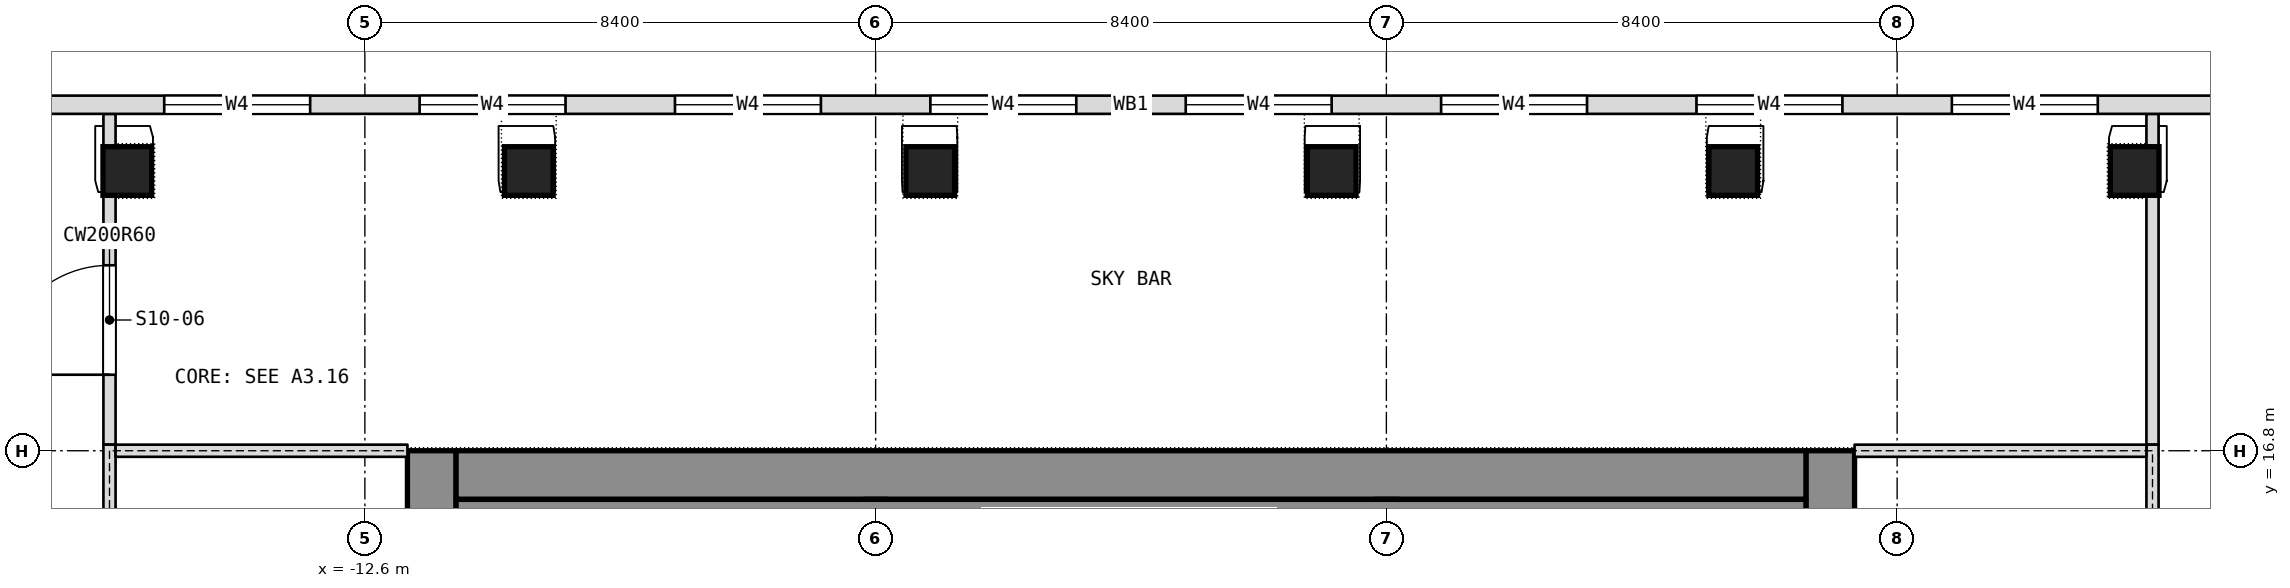
"""IFC4 building model, lengths in metres.
Left out: names, types, materials, properties, quantities, classifications, styles, units other than length and angle.
Written with IfcOpenShell. Run it as: python <this file> out.ifc"""

import sys

from ifc_helpers import new_model, si_unit, direction, frame, frame_2d, origin, origin_2d, place, context, subcontext, project, spatial, rectangle, extrude, element, fill, save


model = new_model("IFC4")
c1 = context("Model", 3, precision=1e-05, world=origin(), true_north=direction((0.0, 1.0)))
c2 = subcontext(c1, "Body", "Model", "MODEL_VIEW")
j1 = project(units=[si_unit("LENGTHUNIT", "METRE"), si_unit("PLANEANGLEUNIT", "RADIAN")], contexts=[c1])
p1 = place(None, origin())
s1 = spatial("IfcSite", under=j1, at=p1, CompositionType="ELEMENT")
p2 = place(p1, origin())
s2 = spatial("IfcBuilding", under=s1, at=p2, CompositionType="ELEMENT")
p3 = place(p2, frame((0.0, 0.0, 180.5)))
s3 = spatial("IfcBuildingStorey", under=s2, at=p3, CompositionType="ELEMENT", Elevation=180.5)
p4 = place(p3, frame((11.5, 0.0, 0.0), z_axis=(0.0, 0.0, 1.0), x_axis=(0.0, 1.0, 0.0)))
e1 = element("IfcWall", 1, at=p4, inside=s3, PredefinedType="SHEAR", context=c2, shape_type="SweptSolid", body=[
    extrude(rectangle(XDim=16.8, YDim=0.8, at=frame_2d((8.4, 0.0))), origin(), (0.0, 0.0, 1.0), 7.2),
])
p5 = place(p4, frame((2.3, 0.0, 0.0)))
e2 = element("IfcOpeningElement", 2, at=p5, cuts=e1, PredefinedType="OPENING", context=c2, shape_type="SweptSolid", body=[
    extrude(rectangle(XDim=1.1, YDim=2.1, at=frame_2d((0.55, 1.05))), frame((0.0, 0.4, 0.0), z_axis=(0.0, -1.0, 0.0), x_axis=(1.0, 0.0, 0.0)), (0.0, 0.0, 1.0), 0.8),
])
p6 = place(p4, frame((4.85, 0.0, 0.0)))
e3 = element("IfcOpeningElement", 3, at=p6, cuts=e1, PredefinedType="OPENING", context=c2, shape_type="SweptSolid", body=[
    extrude(rectangle(XDim=1.1, YDim=2.1, at=frame_2d((0.55, 1.05))), frame((0.0, 0.4, 0.0), z_axis=(0.0, -1.0, 0.0), x_axis=(1.0, 0.0, 0.0)), (0.0, 0.0, 1.0), 0.8),
])
p7 = place(p4, frame((6.825, 0.0, 0.0)))
e4 = element("IfcOpeningElement", 4, at=p7, cuts=e1, PredefinedType="OPENING", context=c2, shape_type="SweptSolid", body=[
    extrude(rectangle(XDim=1.2, YDim=2.1, at=frame_2d((0.6, 1.05))), frame((0.0, 0.4, 0.0), z_axis=(0.0, -1.0, 0.0), x_axis=(1.0, 0.0, 0.0)), (0.0, 0.0, 1.0), 0.8),
])
p8 = place(p4, frame((13.4, 0.0, 0.0)))
e5 = element("IfcOpeningElement", 5, at=p8, cuts=e1, PredefinedType="OPENING", context=c2, shape_type="SweptSolid", body=[
    extrude(rectangle(XDim=1.1, YDim=2.1, at=frame_2d((0.55, 1.05))), frame((0.0, 0.4, 0.0), z_axis=(0.0, -1.0, 0.0), x_axis=(1.0, 0.0, 0.0)), (0.0, 0.0, 1.0), 0.8),
])
p9 = place(p4, frame((10.85, 0.0, 0.0)))
e6 = element("IfcOpeningElement", 6, at=p9, cuts=e1, PredefinedType="OPENING", context=c2, shape_type="SweptSolid", body=[
    extrude(rectangle(XDim=1.1, YDim=2.1, at=frame_2d((0.55, 1.05))), frame((0.0, 0.4, 0.0), z_axis=(0.0, -1.0, 0.0), x_axis=(1.0, 0.0, 0.0)), (0.0, 0.0, 1.0), 0.8),
])
p10 = place(p4, frame((8.775, 0.0, 0.0)))
e7 = element("IfcOpeningElement", 7, at=p10, cuts=e1, PredefinedType="OPENING", context=c2, shape_type="SweptSolid", body=[
    extrude(rectangle(XDim=1.2, YDim=2.1, at=frame_2d((0.6, 1.05))), frame((0.0, 0.4, 0.0), z_axis=(0.0, -1.0, 0.0), x_axis=(1.0, 0.0, 0.0)), (0.0, 0.0, 1.0), 0.8),
])
p11 = place(p3, frame((-11.5, 0.0, 0.0), z_axis=(0.0, 0.0, 1.0), x_axis=(0.0, 1.0, 0.0)))
e8 = element("IfcWall", 8, at=p11, inside=s3, PredefinedType="SHEAR", context=c2, shape_type="SweptSolid", body=[
    extrude(rectangle(XDim=16.8, YDim=0.8, at=frame_2d((8.4, 0.0))), origin(), (0.0, 0.0, 1.0), 7.2),
])
p12 = place(p11, frame((3.6, 0.0, 0.0)))
e9 = element("IfcOpeningElement", 9, at=p12, cuts=e8, PredefinedType="OPENING", context=c2, shape_type="SweptSolid", body=[
    extrude(rectangle(XDim=0.9, YDim=2.1, at=frame_2d((0.45, 1.05))), frame((0.0, 0.4, 0.0), z_axis=(0.0, -1.0, 0.0), x_axis=(1.0, 0.0, 0.0)), (0.0, 0.0, 1.0), 0.8),
])
p13 = place(p11, frame((6.825, 0.0, 0.0)))
e10 = element("IfcOpeningElement", 10, at=p13, cuts=e8, PredefinedType="OPENING", context=c2, shape_type="SweptSolid", body=[
    extrude(rectangle(XDim=1.2, YDim=2.1, at=frame_2d((0.6, 1.05))), frame((0.0, 0.4, 0.0), z_axis=(0.0, -1.0, 0.0), x_axis=(1.0, 0.0, 0.0)), (0.0, 0.0, 1.0), 0.8),
])
p14 = place(p11, frame((12.3, 0.0, 0.0)))
e11 = element("IfcOpeningElement", 11, at=p14, cuts=e8, PredefinedType="OPENING", context=c2, shape_type="SweptSolid", body=[
    extrude(rectangle(XDim=0.9, YDim=2.1, at=frame_2d((0.45, 1.05))), frame((0.0, 0.4, 0.0), z_axis=(0.0, -1.0, 0.0), x_axis=(1.0, 0.0, 0.0)), (0.0, 0.0, 1.0), 0.8),
])
p15 = place(p11, frame((8.775, 0.0, 0.0)))
e12 = element("IfcOpeningElement", 12, at=p15, cuts=e8, PredefinedType="OPENING", context=c2, shape_type="SweptSolid", body=[
    extrude(rectangle(XDim=1.2, YDim=2.1, at=frame_2d((0.6, 1.05))), frame((0.0, 0.4, 0.0), z_axis=(0.0, -1.0, 0.0), x_axis=(1.0, 0.0, 0.0)), (0.0, 0.0, 1.0), 0.8),
])
p16 = place(p3, frame((-11.1, 16.4, 0.0), z_axis=(0.0, 0.0, 1.0), x_axis=(1.0, 0.0, 0.0)))
e13 = element("IfcWall", 13, at=p16, inside=s3, PredefinedType="SHEAR", context=c2, shape_type="SweptSolid", body=[
    extrude(rectangle(XDim=22.2, YDim=0.8, at=frame_2d((11.1, 0.0))), origin(), (0.0, 0.0, 1.0), 7.2),
])
p17 = place(p3, frame((-4.2, 0.8, 0.0), z_axis=(0.0, 0.0, 1.0), x_axis=(0.0, 1.0, 0.0)))
e14 = element("IfcWall", 14, at=p17, inside=s3, PredefinedType="SHEAR", context=c2, shape_type="SweptSolid", body=[
    extrude(rectangle(XDim=15.2, YDim=0.4, at=frame_2d((7.6, 0.0))), origin(), (0.0, 0.0, 1.0), 7.2),
])
p18 = place(p17, frame((8.5, 0.0, 0.0)))
e15 = element("IfcOpeningElement", 15, at=p18, cuts=e14, PredefinedType="OPENING", context=c2, shape_type="SweptSolid", body=[
    extrude(rectangle(XDim=1.2, YDim=2.1, at=frame_2d((0.6, 1.05))), frame((0.0, 0.2, 0.0), z_axis=(0.0, -1.0, 0.0), x_axis=(1.0, 0.0, 0.0)), (0.0, 0.0, 1.0), 0.4),
])
p19 = place(p3, frame((4.2, 0.8, 0.0), z_axis=(0.0, 0.0, 1.0), x_axis=(0.0, 1.0, 0.0)))
e16 = element("IfcWall", 16, at=p19, inside=s3, PredefinedType="SHEAR", context=c2, shape_type="SweptSolid", body=[
    extrude(rectangle(XDim=15.2, YDim=0.4, at=frame_2d((7.6, 0.0))), origin(), (0.0, 0.0, 1.0), 7.2),
])
p20 = place(p19, frame((5.95, 0.0, 0.0)))
e17 = element("IfcOpeningElement", 17, at=p20, cuts=e16, PredefinedType="OPENING", context=c2, shape_type="SweptSolid", body=[
    extrude(rectangle(XDim=1.2, YDim=2.1, at=frame_2d((0.6, 1.05))), frame((0.0, 0.2, 0.0), z_axis=(0.0, -1.0, 0.0), x_axis=(1.0, 0.0, 0.0)), (0.0, 0.0, 1.0), 0.4),
])
for number, where, z_axis, x_axis in (
    (18, (-16.507, 21.4, 0.0), (0.0, 0.0, 1.0), (1.0, 0.0, 0.0)),
    (19, (-9.904, 21.4, 0.0), (0.0, 0.0, 1.0), (1.0, 0.0, 0.0)),
    (20, (-3.302, 21.4, 0.0), (0.0, 0.0, 1.0), (1.0, 0.0, 0.0)),
    (21, (3.302, 21.4, 0.0), (0.0, 0.0, 1.0), (1.0, 0.0, 0.0)),
    (22, (9.904, 21.4, 0.0), (0.0, 0.0, 1.0), (1.0, 0.0, 0.0)),
    (23, (16.507, 21.4, 0.0), (0.0, 0.0, 1.0), (1.0, 0.0, 0.0)),
):
    element("IfcColumn", number, at=place(p3, frame(where, z_axis=z_axis, x_axis=x_axis)), inside=s3, PredefinedType="COLUMN", context=c2, shape_type="SweptSolid", body=[
        extrude(rectangle(XDim=0.8, YDim=0.8, at=origin_2d()), origin(), (0.0, 0.0, 1.0), 7.2),
    ])
p21 = place(p3, frame((16.8, 16.9, 0.0), z_axis=(0.0, 0.0, 1.0), x_axis=(0.0, 1.0, 0.0)))
e24 = element("IfcWall", 24, at=p21, inside=s3, PredefinedType="PARTITIONING", context=c2, shape_type="SweptSolid", body=[
    extrude(rectangle(XDim=4.1, YDim=0.2, at=frame_2d((2.05, 0.0))), origin(), (0.0, 0.0, 1.0), 6.94),
])
p22 = place(p3, frame((16.8, 21.8, 0.0), z_axis=(0.0, 0.0, 1.0), x_axis=(0.0, 1.0, 0.0)))
e25 = element("IfcWall", 25, at=p22, inside=s3, PredefinedType="PARTITIONING", context=c2, shape_type="SweptSolid", body=[
    extrude(rectangle(XDim=0.54, YDim=0.2, at=frame_2d((0.27, 0.0))), origin(), (0.0, 0.0, 1.0), 6.94),
])
p23 = place(p3, frame((-16.8, 16.9, 0.0), z_axis=(0.0, 0.0, 1.0), x_axis=(0.0, 1.0, 0.0)))
e26 = element("IfcWall", 26, at=p23, inside=s3, PredefinedType="PARTITIONING", context=c2, shape_type="SweptSolid", body=[
    extrude(rectangle(XDim=4.1, YDim=0.2, at=frame_2d((2.05, 0.0))), origin(), (0.0, 0.0, 1.0), 6.94),
])
p24 = place(p23, frame((1.15, 0.0, 0.0)))
e27 = element("IfcOpeningElement", 27, at=p24, cuts=e26, PredefinedType="OPENING", context=c2, shape_type="SweptSolid", body=[
    extrude(rectangle(XDim=1.8, YDim=2.1, at=frame_2d((0.9, 1.05))), frame((0.0, 0.1, 0.0), z_axis=(0.0, -1.0, 0.0), x_axis=(1.0, 0.0, 0.0)), (0.0, 0.0, 1.0), 0.2),
])
p25 = place(p3, frame((-16.8, 21.8, 0.0), z_axis=(0.0, 0.0, 1.0), x_axis=(0.0, 1.0, 0.0)))
e28 = element("IfcWall", 28, at=p25, inside=s3, PredefinedType="PARTITIONING", context=c2, shape_type="SweptSolid", body=[
    extrude(rectangle(XDim=0.54, YDim=0.2, at=frame_2d((0.27, 0.0))), origin(), (0.0, 0.0, 1.0), 6.94),
])
p26 = place(p3, frame((19.206, 22.49, 0.0), z_axis=(0.0, 0.0, 1.0), x_axis=(-1.0, 0.0, 0.0)))
e29 = element("IfcWall", 29, at=p26, inside=s3, PredefinedType="NOTDEFINED", context=c2, shape_type="SweptSolid", body=[
    extrude(rectangle(XDim=38.412, YDim=0.3, at=frame_2d((19.206, 0.0))), origin(), (0.0, 0.0, 1.0), 7.2),
])
p27 = place(p26, frame((3.306, 0.0, 0.9)))
e30 = element("IfcOpeningElement", 30, at=p27, cuts=e29, PredefinedType="OPENING", context=c2, shape_type="SweptSolid", body=[
    extrude(rectangle(XDim=2.4, YDim=4.5, at=frame_2d((1.2, 2.25))), frame((0.0, 0.15, 0.0), z_axis=(0.0, -1.0, 0.0), x_axis=(1.0, 0.0, 0.0)), (0.0, 0.0, 1.0), 0.3),
])
p28 = place(p26, frame((7.506, 0.0, 0.9)))
e31 = element("IfcOpeningElement", 31, at=p28, cuts=e29, PredefinedType="OPENING", context=c2, shape_type="SweptSolid", body=[
    extrude(rectangle(XDim=2.4, YDim=4.5, at=frame_2d((1.2, 2.25))), frame((0.0, 0.15, 0.0), z_axis=(0.0, -1.0, 0.0), x_axis=(1.0, 0.0, 0.0)), (0.0, 0.0, 1.0), 0.3),
])
p29 = place(p26, frame((11.706, 0.0, 0.9)))
e32 = element("IfcOpeningElement", 32, at=p29, cuts=e29, PredefinedType="OPENING", context=c2, shape_type="SweptSolid", body=[
    extrude(rectangle(XDim=2.4, YDim=4.5, at=frame_2d((1.2, 2.25))), frame((0.0, 0.15, 0.0), z_axis=(0.0, -1.0, 0.0), x_axis=(1.0, 0.0, 0.0)), (0.0, 0.0, 1.0), 0.3),
])
p30 = place(p26, frame((15.906, 0.0, 0.9)))
e33 = element("IfcOpeningElement", 33, at=p30, cuts=e29, PredefinedType="OPENING", context=c2, shape_type="SweptSolid", body=[
    extrude(rectangle(XDim=2.4, YDim=4.5, at=frame_2d((1.2, 2.25))), frame((0.0, 0.15, 0.0), z_axis=(0.0, -1.0, 0.0), x_axis=(1.0, 0.0, 0.0)), (0.0, 0.0, 1.0), 0.3),
])
p31 = place(p26, frame((20.106, 0.0, 0.9)))
e34 = element("IfcOpeningElement", 34, at=p31, cuts=e29, PredefinedType="OPENING", context=c2, shape_type="SweptSolid", body=[
    extrude(rectangle(XDim=2.4, YDim=4.5, at=frame_2d((1.2, 2.25))), frame((0.0, 0.15, 0.0), z_axis=(0.0, -1.0, 0.0), x_axis=(1.0, 0.0, 0.0)), (0.0, 0.0, 1.0), 0.3),
])
p32 = place(p26, frame((24.306, 0.0, 0.9)))
e35 = element("IfcOpeningElement", 35, at=p32, cuts=e29, PredefinedType="OPENING", context=c2, shape_type="SweptSolid", body=[
    extrude(rectangle(XDim=2.4, YDim=4.5, at=frame_2d((1.2, 2.25))), frame((0.0, 0.15, 0.0), z_axis=(0.0, -1.0, 0.0), x_axis=(1.0, 0.0, 0.0)), (0.0, 0.0, 1.0), 0.3),
])
p33 = place(p26, frame((28.506, 0.0, 0.9)))
e36 = element("IfcOpeningElement", 36, at=p33, cuts=e29, PredefinedType="OPENING", context=c2, shape_type="SweptSolid", body=[
    extrude(rectangle(XDim=2.4, YDim=4.5, at=frame_2d((1.2, 2.25))), frame((0.0, 0.15, 0.0), z_axis=(0.0, -1.0, 0.0), x_axis=(1.0, 0.0, 0.0)), (0.0, 0.0, 1.0), 0.3),
])
p34 = place(p26, frame((32.706, 0.0, 0.9)))
e37 = element("IfcOpeningElement", 37, at=p34, cuts=e29, PredefinedType="OPENING", context=c2, shape_type="SweptSolid", body=[
    extrude(rectangle(XDim=2.4, YDim=4.5, at=frame_2d((1.2, 2.25))), frame((0.0, 0.15, 0.0), z_axis=(0.0, -1.0, 0.0), x_axis=(1.0, 0.0, 0.0)), (0.0, 0.0, 1.0), 0.3),
])
p35 = place(p3, frame((-11.1, 15.65, 0.0), z_axis=(0.0, 0.0, 1.0), x_axis=(1.0, 0.0, 0.0)))
e38 = element("IfcWall", 38, at=p35, inside=s3, PredefinedType="PARTITIONING", context=c2, shape_type="SweptSolid", body=[
    extrude(rectangle(XDim=22.2, YDim=0.7, at=frame_2d((11.1, 0.0))), origin(), (0.0, 0.0, 1.0), 6.94),
])
p36 = place(p3, frame((-16.8, -0.1, 0.0), z_axis=(0.0, 0.0, 1.0), x_axis=(0.0, 1.0, 0.0)))
e39 = element("IfcWall", 39, at=p36, inside=s3, PredefinedType="PARTITIONING", context=c2, shape_type="SweptSolid", body=[
    extrude(rectangle(XDim=17.0, YDim=0.2, at=frame_2d((8.5, 0.0))), origin(), (0.0, 0.0, 1.0), 6.94),
])
p37 = place(p36, frame((1.9, 0.0, 0.0)))
e40 = element("IfcOpeningElement", 40, at=p37, cuts=e39, PredefinedType="OPENING", context=c2, shape_type="SweptSolid", body=[
    extrude(rectangle(XDim=2.4, YDim=2.1, at=frame_2d((1.2, 1.05))), frame((0.0, 0.1, 0.0), z_axis=(0.0, -1.0, 0.0), x_axis=(1.0, 0.0, 0.0)), (0.0, 0.0, 1.0), 0.2),
])
p38 = place(p36, frame((12.7, 0.0, 0.0)))
e41 = element("IfcOpeningElement", 41, at=p38, cuts=e39, PredefinedType="OPENING", context=c2, shape_type="SweptSolid", body=[
    extrude(rectangle(XDim=2.4, YDim=2.1, at=frame_2d((1.2, 1.05))), frame((0.0, 0.1, 0.0), z_axis=(0.0, -1.0, 0.0), x_axis=(1.0, 0.0, 0.0)), (0.0, 0.0, 1.0), 0.2),
])
p39 = place(p3, frame((-16.7, 16.8, 0.0), z_axis=(0.0, 0.0, 1.0), x_axis=(1.0, 0.0, 0.0)))
e42 = element("IfcWall", 42, at=p39, inside=s3, PredefinedType="PARTITIONING", context=c2, shape_type="SweptSolid", body=[
    extrude(rectangle(XDim=4.8, YDim=0.2, at=frame_2d((2.4, 0.0))), origin(), (0.0, 0.0, 1.0), 6.54),
])
p40 = place(p3, frame((16.8, -0.1, 0.0), z_axis=(0.0, 0.0, 1.0), x_axis=(0.0, 1.0, 0.0)))
e43 = element("IfcWall", 43, at=p40, inside=s3, PredefinedType="PARTITIONING", context=c2, shape_type="SweptSolid", body=[
    extrude(rectangle(XDim=17.0, YDim=0.2, at=frame_2d((8.5, 0.0))), origin(), (0.0, 0.0, 1.0), 6.94),
])
p41 = place(p40, frame((1.9, 0.0, 0.0)))
e44 = element("IfcOpeningElement", 44, at=p41, cuts=e43, PredefinedType="OPENING", context=c2, shape_type="SweptSolid", body=[
    extrude(rectangle(XDim=2.4, YDim=2.1, at=frame_2d((1.2, 1.05))), frame((0.0, 0.1, 0.0), z_axis=(0.0, -1.0, 0.0), x_axis=(1.0, 0.0, 0.0)), (0.0, 0.0, 1.0), 0.2),
])
p42 = place(p40, frame((12.7, 0.0, 0.0)))
e45 = element("IfcOpeningElement", 45, at=p42, cuts=e43, PredefinedType="OPENING", context=c2, shape_type="SweptSolid", body=[
    extrude(rectangle(XDim=2.4, YDim=2.1, at=frame_2d((1.2, 1.05))), frame((0.0, 0.1, 0.0), z_axis=(0.0, -1.0, 0.0), x_axis=(1.0, 0.0, 0.0)), (0.0, 0.0, 1.0), 0.2),
])
p43 = place(p3, frame((11.9, 16.8, 0.0), z_axis=(0.0, 0.0, 1.0), x_axis=(1.0, 0.0, 0.0)))
e46 = element("IfcWall", 46, at=p43, inside=s3, PredefinedType="PARTITIONING", context=c2, shape_type="SweptSolid", body=[
    extrude(rectangle(XDim=4.8, YDim=0.2, at=frame_2d((2.4, 0.0))), origin(), (0.0, 0.0, 1.0), 6.54),
])
p44 = place(p24, origin())
e47 = element("IfcDoor", 47, at=p44, inside=s3, OperationType="DOUBLE_DOOR_SINGLE_SWING", PredefinedType="DOOR", context=c2, shape_type="SweptSolid", body=[
    extrude(rectangle(XDim=1.8, YDim=2.1, at=frame_2d((0.9, 1.05))), frame((0.0, 0.025, 0.0), z_axis=(0.0, -1.0, 0.0), x_axis=(1.0, 0.0, 0.0)), (0.0, 0.0, 1.0), 0.05),
])
fill(e27, e47)
p45 = place(p27, origin())
e48 = element("IfcWindow", 48, at=p45, inside=s3, PartitioningType="SINGLE_PANEL", PredefinedType="WINDOW", context=c2, shape_type="SweptSolid", body=[
    extrude(rectangle(XDim=2.4, YDim=4.5, at=frame_2d((1.2, 2.25))), frame((0.0, 0.03, 0.0), z_axis=(0.0, -1.0, 0.0), x_axis=(1.0, 0.0, 0.0)), (0.0, 0.0, 1.0), 0.06),
])
fill(e30, e48)
p46 = place(p28, origin())
e49 = element("IfcWindow", 49, at=p46, inside=s3, PartitioningType="SINGLE_PANEL", PredefinedType="WINDOW", context=c2, shape_type="SweptSolid", body=[
    extrude(rectangle(XDim=2.4, YDim=4.5, at=frame_2d((1.2, 2.25))), frame((0.0, 0.03, 0.0), z_axis=(0.0, -1.0, 0.0), x_axis=(1.0, 0.0, 0.0)), (0.0, 0.0, 1.0), 0.06),
])
fill(e31, e49)
p47 = place(p29, origin())
e50 = element("IfcWindow", 50, at=p47, inside=s3, PartitioningType="SINGLE_PANEL", PredefinedType="WINDOW", context=c2, shape_type="SweptSolid", body=[
    extrude(rectangle(XDim=2.4, YDim=4.5, at=frame_2d((1.2, 2.25))), frame((0.0, 0.03, 0.0), z_axis=(0.0, -1.0, 0.0), x_axis=(1.0, 0.0, 0.0)), (0.0, 0.0, 1.0), 0.06),
])
fill(e32, e50)
p48 = place(p30, origin())
e51 = element("IfcWindow", 51, at=p48, inside=s3, PartitioningType="SINGLE_PANEL", PredefinedType="WINDOW", context=c2, shape_type="SweptSolid", body=[
    extrude(rectangle(XDim=2.4, YDim=4.5, at=frame_2d((1.2, 2.25))), frame((0.0, 0.03, 0.0), z_axis=(0.0, -1.0, 0.0), x_axis=(1.0, 0.0, 0.0)), (0.0, 0.0, 1.0), 0.06),
])
fill(e33, e51)
p49 = place(p31, origin())
e52 = element("IfcWindow", 52, at=p49, inside=s3, PartitioningType="SINGLE_PANEL", PredefinedType="WINDOW", context=c2, shape_type="SweptSolid", body=[
    extrude(rectangle(XDim=2.4, YDim=4.5, at=frame_2d((1.2, 2.25))), frame((0.0, 0.03, 0.0), z_axis=(0.0, -1.0, 0.0), x_axis=(1.0, 0.0, 0.0)), (0.0, 0.0, 1.0), 0.06),
])
fill(e34, e52)
p50 = place(p32, origin())
e53 = element("IfcWindow", 53, at=p50, inside=s3, PartitioningType="SINGLE_PANEL", PredefinedType="WINDOW", context=c2, shape_type="SweptSolid", body=[
    extrude(rectangle(XDim=2.4, YDim=4.5, at=frame_2d((1.2, 2.25))), frame((0.0, 0.03, 0.0), z_axis=(0.0, -1.0, 0.0), x_axis=(1.0, 0.0, 0.0)), (0.0, 0.0, 1.0), 0.06),
])
fill(e35, e53)
p51 = place(p33, origin())
e54 = element("IfcWindow", 54, at=p51, inside=s3, PartitioningType="SINGLE_PANEL", PredefinedType="WINDOW", context=c2, shape_type="SweptSolid", body=[
    extrude(rectangle(XDim=2.4, YDim=4.5, at=frame_2d((1.2, 2.25))), frame((0.0, 0.03, 0.0), z_axis=(0.0, -1.0, 0.0), x_axis=(1.0, 0.0, 0.0)), (0.0, 0.0, 1.0), 0.06),
])
fill(e36, e54)
p52 = place(p34, origin())
e55 = element("IfcWindow", 55, at=p52, inside=s3, PartitioningType="SINGLE_PANEL", PredefinedType="WINDOW", context=c2, shape_type="SweptSolid", body=[
    extrude(rectangle(XDim=2.4, YDim=4.5, at=frame_2d((1.2, 2.25))), frame((0.0, 0.03, 0.0), z_axis=(0.0, -1.0, 0.0), x_axis=(1.0, 0.0, 0.0)), (0.0, 0.0, 1.0), 0.06),
])
fill(e37, e55)
save(model, sys.argv[1])
